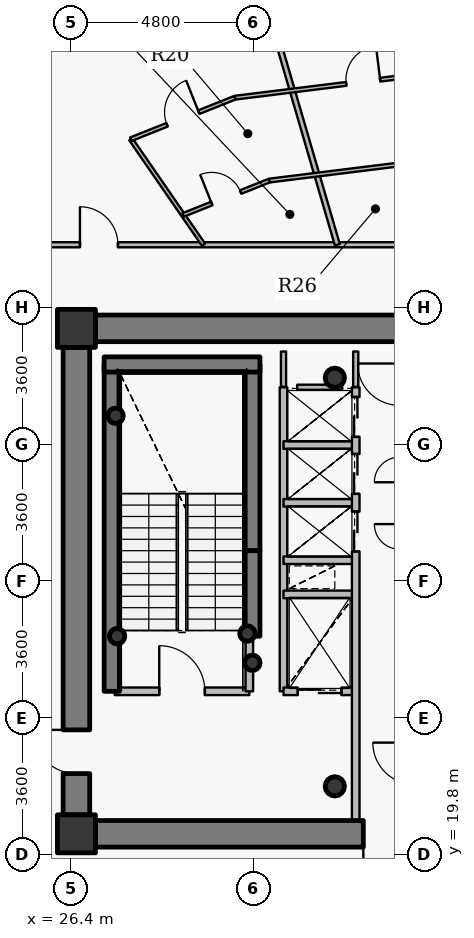
"""IFC4 building model, lengths in metres.
Left out: names, types, materials, properties, quantities, classifications, styles, units other than length and angle.
Written with IfcOpenShell. Run it as: python <this file> out.ifc"""

import sys

from ifc_helpers import new_model, si_unit, direction, frame, frame_2d, origin, origin_2d, place, context, subcontext, project, spatial, rectangle, hollow_circle, extrude, source, transform, mapped, element, fill, save


model = new_model("IFC4")
c1 = context("Model", 3, precision=1e-05, world=origin(), true_north=direction((0.0, 1.0)))
c2 = subcontext(c1, "Body", "Model", "MODEL_VIEW")
j1 = project(units=[si_unit("LENGTHUNIT", "METRE"), si_unit("PLANEANGLEUNIT", "RADIAN")], contexts=[c1])
p1 = place(None, origin())
s1 = spatial("IfcSite", under=j1, at=p1, CompositionType="ELEMENT")
p2 = place(p1, origin())
s2 = spatial("IfcBuilding", under=s1, at=p2, CompositionType="ELEMENT")
p3 = place(p2, frame((0.0, 0.0, 221.55)))
s3 = spatial("IfcBuildingStorey", under=s2, at=p3, CompositionType="ELEMENT", Elevation=221.55)
for number, where, z_axis, x_axis in (
    (1, (26.55, 20.35, 0.0), (0.0, 0.0, 1.0), (1.0, 0.0, 0.0)),
    (2, (26.55, 33.65, 0.0), (0.0, 0.0, 1.0), (1.0, 0.0, 0.0)),
):
    element("IfcColumn", number, at=place(p3, frame(where, z_axis=z_axis, x_axis=x_axis)), inside=s3, PredefinedType="COLUMN", context=c2, shape_type="SweptSolid", body=[
        extrude(rectangle(XDim=1.0, YDim=1.0, at=origin_2d()), origin(), (0.0, 0.0, 1.0), 3.75),
    ])
for number, where, z_axis, x_axis in (
    (3, (33.35, 21.6, 0.0), (0.0, 0.0, 1.0), (1.0, 0.0, 0.0)),
    (4, (33.35, 32.35, 0.0), (0.0, 0.0, 1.0), (1.0, 0.0, 0.0)),
):
    element("IfcColumn", number, at=place(p3, frame(where, z_axis=z_axis, x_axis=x_axis)), inside=s3, PredefinedType="COLUMN", context=c2, shape_type="SweptSolid", body=[
        extrude(hollow_circle(Radius=0.254, WallThickness=0.02, at=origin_2d()), origin(), (0.0, 0.0, 1.0), 3.75),
    ])
p4 = place(p3, frame((27.48, 24.1, 0.0), z_axis=(0.0, 0.0, 1.0), x_axis=(0.0, 1.0, 0.0)))
e5 = element("IfcWall", 5, at=p4, inside=s3, PredefinedType="SHEAR", context=c2, shape_type="SweptSolid", body=[
    extrude(rectangle(XDim=8.6, YDim=0.4, at=frame_2d((4.3, 0.0))), origin(), (0.0, 0.0, 1.0), 3.75),
])
p5 = place(p3, frame((31.18, 27.8, 0.0), z_axis=(0.0, 0.0, 1.0), x_axis=(0.0, 1.0, 0.0)))
e6 = element("IfcWall", 6, at=p5, inside=s3, PredefinedType="SHEAR", context=c2, shape_type="SweptSolid", body=[
    extrude(rectangle(XDim=4.9, YDim=0.4, at=frame_2d((2.45, 0.0))), origin(), (0.0, 0.0, 1.0), 3.75),
])
p6 = place(p3, frame((27.28, 32.7, 0.0), z_axis=(0.0, 0.0, 1.0), x_axis=(1.0, 0.0, 0.0)))
e7 = element("IfcWall", 7, at=p6, inside=s3, PredefinedType="SHEAR", context=c2, shape_type="SweptSolid", body=[
    extrude(rectangle(XDim=4.1, YDim=0.4, at=frame_2d((2.05, 0.0))), origin(), (0.0, 0.0, 1.0), 3.75),
])
for number, where, z_axis, x_axis in (
    (8, (27.58, 31.35, 0.0), (0.0, 0.0, 1.0), (1.0, 0.0, 0.0)),
    (9, (31.05, 25.62, 0.0), (0.0, 0.0, 1.0), (1.0, 0.0, 0.0)),
    (10, (31.18, 24.85, 0.0), (0.0, 0.0, 1.0), (1.0, 0.0, 0.0)),
    (11, (27.62, 25.55, 0.0), (0.0, 0.0, 1.0), (1.0, 0.0, 0.0)),
):
    element("IfcColumn", number, at=place(p3, frame(where, z_axis=z_axis, x_axis=x_axis)), inside=s3, PredefinedType="COLUMN", context=c2, shape_type="SweptSolid", body=[
        extrude(hollow_circle(Radius=0.203, WallThickness=0.016, at=origin_2d()), origin(), (0.0, 0.0, 1.0), 3.75),
    ])
p7 = place(p3, frame((27.05, 33.65, 0.0), z_axis=(0.0, 0.0, 1.0), x_axis=(1.0, 0.0, 0.0)))
e12 = element("IfcWall", 12, at=p7, inside=s3, PredefinedType="SHEAR", context=c2, shape_type="SweptSolid", body=[
    extrude(rectangle(XDim=17.9, YDim=0.7, at=frame_2d((8.95, 0.0))), origin(), (0.0, 0.0, 1.0), 3.05),
])
p8 = place(p7, frame((13.675, 0.0, 0.0)))
e13 = element("IfcOpeningElement", 13, at=p8, cuts=e12, PredefinedType="OPENING", context=c2, shape_type="SweptSolid", body=[
    extrude(rectangle(XDim=1.15, YDim=2.15, at=origin_2d()), frame((0.575, 0.36, 1.075), z_axis=(0.0, -1.0, 0.0), x_axis=(1.0, 0.0, 0.0)), (0.0, 0.0, 1.0), 0.72),
])
p9 = place(p3, frame((44.95, 20.35, 0.0), z_axis=(0.0, 0.0, 1.0), x_axis=(-1.0, 0.0, 0.0)))
e14 = element("IfcWall", 14, at=p9, inside=s3, PredefinedType="SHEAR", context=c2, shape_type="SweptSolid", body=[
    extrude(rectangle(XDim=17.9, YDim=0.7, at=frame_2d((8.95, 0.0))), origin(), (0.0, 0.0, 1.0), 3.05),
])
p10 = place(p9, frame((9.7, 0.0, 0.0)))
e15 = element("IfcOpeningElement", 15, at=p10, cuts=e14, PredefinedType="OPENING", context=c2, shape_type="SweptSolid", body=[
    extrude(rectangle(XDim=1.15, YDim=2.15, at=origin_2d()), frame((0.575, 0.36, 1.075), z_axis=(0.0, -1.0, 0.0), x_axis=(1.0, 0.0, 0.0)), (0.0, 0.0, 1.0), 0.72),
])
p11 = place(p3, frame((26.55, 20.85, 0.0), z_axis=(0.0, 0.0, 1.0), x_axis=(0.0, 1.0, 0.0)))
e16 = element("IfcWall", 16, at=p11, inside=s3, PredefinedType="SHEAR", context=c2, shape_type="SweptSolid", body=[
    extrude(rectangle(XDim=12.3, YDim=0.7, at=frame_2d((6.15, 0.0))), origin(), (0.0, 0.0, 1.0), 3.05),
])
p12 = place(p11, frame((1.085, 0.0, 0.0)))
e17 = element("IfcOpeningElement", 17, at=p12, cuts=e16, PredefinedType="OPENING", context=c2, shape_type="SweptSolid", body=[
    extrude(rectangle(XDim=1.15, YDim=2.15, at=origin_2d()), frame((0.575, 0.36, 1.075), z_axis=(0.0, -1.0, 0.0), x_axis=(1.0, 0.0, 0.0)), (0.0, 0.0, 1.0), 0.72),
])
p13 = place(p3, frame((31.18, 25.55, 0.0), z_axis=(0.0, 0.0, 1.0), x_axis=(0.0, 1.0, 0.0)))
e18 = element("IfcWall", 18, at=p13, inside=s3, PredefinedType="SHEAR", context=c2, shape_type="SweptSolid", body=[
    extrude(rectangle(XDim=2.25, YDim=0.4, at=frame_2d((1.125, 0.0))), origin(), (0.0, 0.0, 1.0), 3.1),
])
p14 = place(p3, frame((24.35, 35.85, 0.0), z_axis=(0.0, 0.0, 1.0), x_axis=(1.0, 0.0, 0.0)))
e19 = element("IfcWall", 19, at=p14, inside=s3, PredefinedType="PARTITIONING", context=c2, shape_type="SweptSolid", body=[
    extrude(rectangle(XDim=26.218, YDim=0.135, at=frame_2d((13.109, 0.0))), origin(), (0.0, 0.0, 1.0), 2.935),
])
p15 = place(p14, frame((21.507, 0.0, 0.0)))
e20 = element("IfcOpeningElement", 20, at=p15, cuts=e19, PredefinedType="OPENING", context=c2, shape_type="SweptSolid", body=[
    extrude(rectangle(XDim=1.0, YDim=2.15, at=origin_2d()), frame((0.5, 0.078, 1.075), z_axis=(0.0, -1.0, 0.0), x_axis=(1.0, 0.0, 0.0)), (0.0, 0.0, 1.0), 0.155),
])
p16 = place(p14, frame((12.95, 0.0, 0.0)))
e21 = element("IfcOpeningElement", 21, at=p16, cuts=e19, PredefinedType="OPENING", context=c2, shape_type="SweptSolid", body=[
    extrude(rectangle(XDim=1.0, YDim=2.15, at=origin_2d()), frame((0.5, 0.078, 1.075), z_axis=(0.0, -1.0, 0.0), x_axis=(1.0, 0.0, 0.0)), (0.0, 0.0, 1.0), 0.155),
])
p17 = place(p14, frame((2.293, 0.0, 0.0)))
e22 = element("IfcOpeningElement", 22, at=p17, cuts=e19, PredefinedType="OPENING", context=c2, shape_type="SweptSolid", body=[
    extrude(rectangle(XDim=1.0, YDim=2.15, at=origin_2d()), frame((0.5, 0.078, 1.075), z_axis=(0.0, -1.0, 0.0), x_axis=(1.0, 0.0, 0.0)), (0.0, 0.0, 1.0), 0.155),
])
p18 = place(p3, frame((27.56, 24.1, 0.0), z_axis=(0.0, 0.0, 1.0), x_axis=(1.0, 0.0, 0.0)))
e23 = element("IfcWall", 23, at=p18, inside=s3, PredefinedType="PARTITIONING", context=c2, shape_type="SweptSolid", body=[
    extrude(rectangle(XDim=3.54, YDim=0.2, at=frame_2d((1.77, 0.0))), origin(), (0.0, 0.0, 1.0), 3.5),
])
p19 = place(p18, frame((1.17, 0.0, 0.0)))
e24 = element("IfcOpeningElement", 24, at=p19, cuts=e23, PredefinedType="OPENING", context=c2, shape_type="SweptSolid", body=[
    extrude(rectangle(XDim=1.2, YDim=2.15, at=origin_2d()), frame((0.6, 0.11, 1.075), z_axis=(0.0, -1.0, 0.0), x_axis=(1.0, 0.0, 0.0)), (0.0, 0.0, 1.0), 0.22),
])
p20 = place(p3, frame((27.982, 38.626, 0.0), z_axis=(0.0, 0.0, 1.0), x_axis=(0.56776340906, -0.823191782838, 0.0)))
e25 = element("IfcWall", 25, at=p20, inside=s3, PredefinedType="PARTITIONING", context=c2, shape_type="SweptSolid", body=[
    extrude(rectangle(XDim=3.372, YDim=0.1, at=frame_2d((1.686, 0.0))), origin(), (0.0, 0.0, 1.0), 3.5),
])
p21 = place(p3, frame((27.982, 38.626, 0.0), z_axis=(0.0, 0.0, 1.0), x_axis=(0.928795965169, 0.370591493542, 0.0)))
e26 = element("IfcWall", 26, at=p21, inside=s3, PredefinedType="PARTITIONING", context=c2, shape_type="SweptSolid", body=[
    extrude(rectangle(XDim=2.95, YDim=0.1, at=frame_2d((1.475, 0.0))), origin(), (0.0, 0.0, 1.0), 2.935),
])
p22 = place(p21, frame((1.025, 0.0, 0.0)))
e27 = element("IfcOpeningElement", 27, at=p22, cuts=e26, PredefinedType="OPENING", context=c2, shape_type="SweptSolid", body=[
    extrude(rectangle(XDim=0.9, YDim=2.1, at=origin_2d()), frame((0.45, 0.06, 1.05), z_axis=(0.0, -1.0, 0.0), x_axis=(1.0, 0.0, 0.0)), (0.0, 0.0, 1.0), 0.12),
])
p23 = place(p3, frame((29.356, 36.633, 0.0), z_axis=(0.0, 0.0, 1.0), x_axis=(0.928806968298, 0.370563915731, 0.0)))
e28 = element("IfcWall", 28, at=p23, inside=s3, PredefinedType="PARTITIONING", context=c2, shape_type="SweptSolid", body=[
    extrude(rectangle(XDim=2.444, YDim=0.1, at=frame_2d((1.222, 0.0))), origin(), (0.0, 0.0, 1.0), 2.935),
])
p24 = place(p23, frame((0.812, 0.0, 0.0)))
e29 = element("IfcOpeningElement", 29, at=p24, cuts=e28, PredefinedType="OPENING", context=c2, shape_type="SweptSolid", body=[
    extrude(rectangle(XDim=0.82, YDim=2.1, at=origin_2d()), frame((0.41, 0.06, 1.05), z_axis=(0.0, -1.0, 0.0), x_axis=(1.0, 0.0, 0.0)), (0.0, 0.0, 1.0), 0.12),
])
p25 = place(p3, frame((30.613, 45.453, 0.0), z_axis=(0.0, 0.0, 1.0), x_axis=(0.280222100614, -0.959935192775, 0.0)))
e30 = element("IfcWall", 30, at=p25, inside=s3, PredefinedType="PARTITIONING", context=c2, shape_type="SweptSolid", body=[
    extrude(rectangle(XDim=10.004, YDim=0.135, at=frame_2d((5.002, 0.0))), origin(), (0.0, 0.0, 1.0), 2.985),
])
p26 = place(p3, frame((30.722, 39.719, 0.0), z_axis=(0.0, 0.0, 1.0), x_axis=(0.992398169186, 0.123068573551, 0.0)))
e31 = element("IfcWall", 31, at=p26, inside=s3, PredefinedType="PARTITIONING", context=c2, shape_type="SweptSolid", body=[
    extrude(rectangle(XDim=5.319, YDim=0.1, at=frame_2d((2.659, 0.0))), origin(), (0.0, 0.0, 1.0), 2.935),
])
p27 = place(p26, frame((2.95, 0.0, 0.0)))
e32 = element("IfcOpeningElement", 32, at=p27, cuts=e31, PredefinedType="OPENING", context=c2, shape_type="SweptSolid", body=[
    extrude(rectangle(XDim=0.9, YDim=2.1, at=origin_2d()), frame((0.45, 0.06, 1.05), z_axis=(0.0, -1.0, 0.0), x_axis=(1.0, 0.0, 0.0)), (0.0, 0.0, 1.0), 0.12),
])
p28 = place(p3, frame((31.1, 24.1, 0.0), z_axis=(0.0, 0.0, 1.0), x_axis=(0.0, 1.0, 0.0)))
e33 = element("IfcWall", 33, at=p28, inside=s3, PredefinedType="PARTITIONING", context=c2, shape_type="SweptSolid", body=[
    extrude(rectangle(XDim=1.44, YDim=0.2, at=frame_2d((0.72, 0.0))), origin(), (0.0, 0.0, 1.0), 3.5),
])
p29 = place(p3, frame((31.627, 37.539, 0.0), z_axis=(0.0, 0.0, 1.0), x_axis=(0.992401810072, 0.123039210683, 0.0)))
e34 = element("IfcWall", 34, at=p29, inside=s3, PredefinedType="PARTITIONING", context=c2, shape_type="SweptSolid", body=[
    extrude(rectangle(XDim=4.407, YDim=0.1, at=frame_2d((2.204, 0.0))), origin(), (0.0, 0.0, 1.0), 2.935),
])
p30 = place(p3, frame((32.0, 24.1, 0.0), z_axis=(0.0, 0.0, 1.0), x_axis=(0.0, 1.0, 0.0)))
e35 = element("IfcWall", 35, at=p30, inside=s3, PredefinedType="PARTITIONING", context=c2, shape_type="SweptSolid", body=[
    extrude(rectangle(XDim=8.0, YDim=0.2, at=frame_2d((4.0, 0.0))), origin(), (0.0, 0.0, 1.0), 3.5),
])
p31 = place(p3, frame((32.0, 24.1, 0.0), z_axis=(0.0, 0.0, 1.0), x_axis=(1.0, 0.0, 0.0)))
e36 = element("IfcWall", 36, at=p31, inside=s3, PredefinedType="PARTITIONING", context=c2, shape_type="SweptSolid", body=[
    extrude(rectangle(XDim=1.9, YDim=0.2, at=frame_2d((0.95, 0.0))), origin(), (0.0, 0.0, 1.0), 3.085),
])
p32 = place(p31, frame((0.375, 0.0, 0.0)))
e37 = element("IfcOpeningElement", 37, at=p32, cuts=e36, PredefinedType="OPENING", context=c2, shape_type="SweptSolid", body=[
    extrude(rectangle(XDim=1.15, YDim=2.15, at=origin_2d()), frame((0.575, 0.11, 1.075), z_axis=(0.0, -1.0, 0.0), x_axis=(1.0, 0.0, 0.0)), (0.0, 0.0, 1.0), 0.22),
])
for number, where, z_axis, x_axis in (
    (38, (32.0, 26.65, 0.0), (0.0, 0.0, 1.0), (1.0, 0.0, 0.0)),
    (39, (32.0, 27.55, 0.0), (0.0, 0.0, 1.0), (1.0, 0.0, 0.0)),
    (40, (32.0, 29.06, 0.0), (0.0, 0.0, 1.0), (1.0, 0.0, 0.0)),
    (41, (32.0, 30.58, 0.0), (0.0, 0.0, 1.0), (1.0, 0.0, 0.0)),
):
    element("IfcWall", number, at=place(p3, frame(where, z_axis=z_axis, x_axis=x_axis)), inside=s3, PredefinedType="PARTITIONING", context=c2, shape_type="SweptSolid", body=[
        extrude(rectangle(XDim=1.9, YDim=0.2, at=frame_2d((0.95, 0.0))), origin(), (0.0, 0.0, 1.0), 3.085),
    ])
p33 = place(p3, frame((33.9, 20.7, 0.0), z_axis=(0.0, 0.0, 1.0), x_axis=(0.0, 1.0, 0.0)))
e42 = element("IfcWall", 42, at=p33, inside=s3, PredefinedType="PARTITIONING", context=c2, shape_type="SweptSolid", body=[
    extrude(rectangle(XDim=11.4, YDim=0.2, at=frame_2d((5.7, 0.0))), origin(), (0.0, 0.0, 1.0), 3.085),
])
p34 = place(p33, frame((7.08, 0.0, 0.0)))
e43 = element("IfcOpeningElement", 43, at=p34, cuts=e42, PredefinedType="OPENING", context=c2, shape_type="SweptSolid", body=[
    extrude(rectangle(XDim=1.05, YDim=2.15, at=origin_2d()), frame((0.525, 0.11, 1.075), z_axis=(0.0, -1.0, 0.0), x_axis=(1.0, 0.0, 0.0)), (0.0, 0.0, 1.0), 0.22),
])
p35 = place(p33, frame((8.595, 0.0, 0.0)))
e44 = element("IfcOpeningElement", 44, at=p35, cuts=e42, PredefinedType="OPENING", context=c2, shape_type="SweptSolid", body=[
    extrude(rectangle(XDim=1.05, YDim=2.15, at=origin_2d()), frame((0.525, 0.11, 1.075), z_axis=(0.0, -1.0, 0.0), x_axis=(1.0, 0.0, 0.0)), (0.0, 0.0, 1.0), 0.22),
])
p36 = place(p33, frame((10.095, 0.0, 0.0)))
e45 = element("IfcOpeningElement", 45, at=p36, cuts=e42, PredefinedType="OPENING", context=c2, shape_type="SweptSolid", body=[
    extrude(rectangle(XDim=1.05, YDim=2.15, at=origin_2d()), frame((0.525, 0.11, 1.075), z_axis=(0.0, -1.0, 0.0), x_axis=(1.0, 0.0, 0.0)), (0.0, 0.0, 1.0), 0.22),
])
p37 = place(p3, frame((32.36, 32.1, 0.0), z_axis=(0.0, 0.0, 1.0), x_axis=(1.0, 0.0, 0.0)))
e46 = element("IfcWall", 46, at=p37, inside=s3, PredefinedType="PARTITIONING", context=c2, shape_type="SweptSolid", body=[
    extrude(rectangle(XDim=1.18, YDim=0.135, at=frame_2d((0.59, 0.0))), origin(), (0.0, 0.0, 1.0), 3.085),
])
p38 = place(p3, frame((32.0, 33.04, 0.0), z_axis=(0.0, 0.0, 1.0), x_axis=(0.0, -1.0, 0.0)))
e47 = element("IfcWall", 47, at=p38, inside=s3, PredefinedType="PARTITIONING", context=c2, shape_type="SweptSolid", body=[
    extrude(rectangle(XDim=0.93, YDim=0.135, at=frame_2d((0.465, 0.0))), origin(), (0.0, 0.0, 1.0), 3.035),
])
p39 = place(p3, frame((33.9, 32.11, 0.0), z_axis=(0.0, 0.0, 1.0), x_axis=(0.0, 1.0, 0.0)))
e48 = element("IfcWall", 48, at=p39, inside=s3, PredefinedType="PARTITIONING", context=c2, shape_type="SweptSolid", body=[
    extrude(rectangle(XDim=0.93, YDim=0.135, at=frame_2d((0.465, 0.0))), origin(), (0.0, 0.0, 1.0), 3.085),
])
p40 = place(p3, frame((27.04, 34.0, 0.0), z_axis=(0.0, 0.0, 1.0), x_axis=(-1.0, 0.0, 0.0)))
e49 = element("IfcWall", 49, at=p40, inside=s3, PredefinedType="PARTITIONING", context=c2, shape_type="SweptSolid", body=[
    extrude(rectangle(XDim=0.84, YDim=0.135, at=frame_2d((0.42, 0.0))), origin(), (0.0, 0.0, 1.0), 2.935),
])
p41 = place(p3, frame((26.2, 33.692, 0.0), z_axis=(0.0, 0.0, 1.0), x_axis=(0.0, -1.0, 0.0)))
e50 = element("IfcWall", 50, at=p41, inside=s3, PredefinedType="PARTITIONING", context=c2, shape_type="SweptSolid", body=[
    extrude(rectangle(XDim=0.532, YDim=0.135, at=frame_2d((0.266, 0.0))), origin(), (0.0, 0.0, 1.0), 3.5),
])
p42 = place(p3, frame((26.2, 20.84, 0.0), z_axis=(0.0, 0.0, 1.0), x_axis=(0.0, -1.0, 0.0)))
e51 = element("IfcWall", 51, at=p42, inside=s3, PredefinedType="PARTITIONING", context=c2, shape_type="SweptSolid", body=[
    extrude(rectangle(XDim=0.84, YDim=0.135, at=frame_2d((0.42, 0.0))), origin(), (0.0, 0.0, 1.0), 3.5),
])
p43 = place(p3, frame((26.508, 20.0, 0.0), z_axis=(0.0, 0.0, 1.0), x_axis=(1.0, 0.0, 0.0)))
e52 = element("IfcWall", 52, at=p43, inside=s3, PredefinedType="PARTITIONING", context=c2, shape_type="SweptSolid", body=[
    extrude(rectangle(XDim=0.532, YDim=0.135, at=frame_2d((0.266, 0.0))), origin(), (0.0, 0.0, 1.0), 2.935),
])
m1 = source(origin(), c2, "Body", "SweptSolid", [
    extrude(rectangle(XDim=1.15, YDim=2.15, at=origin_2d()), frame((0.575, 0.025, 1.075), z_axis=(0.0, -1.0, 0.0), x_axis=(1.0, 0.0, 0.0)), (0.0, 0.0, 1.0), 0.05),
])
p44 = place(p12, origin())
e53 = element("IfcDoor", 53, at=p44, inside=s3, OperationType="SINGLE_SWING_RIGHT", PredefinedType="DOOR", context=c2, shape_type="MappedRepresentation", body=[
    mapped(m1, transform((0.0, 0.0, 0.0), x_axis=(1.0, 0.0, 0.0), y_axis=(0.0, 1.0, 0.0), z_axis=(0.0, 0.0, 1.0), scale=1.0)),
])
fill(e17, e53)
p45 = place(p10, origin())
e54 = element("IfcDoor", 54, at=p45, inside=s3, OperationType="SINGLE_SWING_RIGHT", PredefinedType="DOOR", context=c2, shape_type="MappedRepresentation", body=[
    mapped(m1, transform((0.0, 0.0, 0.0), x_axis=(1.0, 0.0, 0.0), y_axis=(0.0, 1.0, 0.0), z_axis=(0.0, 0.0, 1.0), scale=1.0)),
])
fill(e15, e54)
m2 = source(origin(), c2, "Body", "SweptSolid", [
    extrude(rectangle(XDim=1.2, YDim=2.15, at=origin_2d()), frame((0.6, 0.025, 1.075), z_axis=(0.0, -1.0, 0.0), x_axis=(1.0, 0.0, 0.0)), (0.0, 0.0, 1.0), 0.05),
])
p46 = place(p19, origin())
e55 = element("IfcDoor", 55, at=p46, inside=s3, OperationType="SINGLE_SWING_LEFT", PredefinedType="DOOR", context=c2, shape_type="MappedRepresentation", body=[
    mapped(m2, transform((0.0, 0.0, 0.0), x_axis=(1.0, 0.0, 0.0), y_axis=(0.0, 1.0, 0.0), z_axis=(0.0, 0.0, 1.0), scale=1.0)),
])
fill(e24, e55)
m3 = source(origin(), c2, "Body", "SweptSolid", [
    extrude(rectangle(XDim=1.15, YDim=2.15, at=origin_2d()), frame((0.575, 0.025, 1.075), z_axis=(0.0, -1.0, 0.0), x_axis=(1.0, 0.0, 0.0)), (0.0, 0.0, 1.0), 0.05),
])
p47 = place(p32, origin())
e56 = element("IfcDoor", 56, at=p47, inside=s3, OperationType="DOUBLE_DOOR_SLIDING", PredefinedType="USERDEFINED", context=c2, shape_type="MappedRepresentation", body=[
    mapped(m3, transform((0.0, 0.0, 0.0), x_axis=(1.0, 0.0, 0.0), y_axis=(0.0, 1.0, 0.0), z_axis=(0.0, 0.0, 1.0), scale=1.0)),
])
fill(e37, e56)
m4 = source(origin(), c2, "Body", "SweptSolid", [
    extrude(rectangle(XDim=1.05, YDim=2.15, at=origin_2d()), frame((0.525, 0.025, 1.075), z_axis=(0.0, -1.0, 0.0), x_axis=(1.0, 0.0, 0.0)), (0.0, 0.0, 1.0), 0.05),
])
p48 = place(p34, origin())
e57 = element("IfcDoor", 57, at=p48, inside=s3, OperationType="DOUBLE_DOOR_SLIDING", PredefinedType="USERDEFINED", context=c2, shape_type="MappedRepresentation", body=[
    mapped(m4, transform((0.0, 0.0, 0.0), x_axis=(1.0, 0.0, 0.0), y_axis=(0.0, 1.0, 0.0), z_axis=(0.0, 0.0, 1.0), scale=1.0)),
])
fill(e43, e57)
p49 = place(p35, origin())
e58 = element("IfcDoor", 58, at=p49, inside=s3, OperationType="DOUBLE_DOOR_SLIDING", PredefinedType="USERDEFINED", context=c2, shape_type="MappedRepresentation", body=[
    mapped(m4, transform((0.0, 0.0, 0.0), x_axis=(1.0, 0.0, 0.0), y_axis=(0.0, 1.0, 0.0), z_axis=(0.0, 0.0, 1.0), scale=1.0)),
])
fill(e44, e58)
p50 = place(p36, origin())
e59 = element("IfcDoor", 59, at=p50, inside=s3, OperationType="DOUBLE_DOOR_SLIDING", PredefinedType="USERDEFINED", context=c2, shape_type="MappedRepresentation", body=[
    mapped(m4, transform((0.0, 0.0, 0.0), x_axis=(1.0, 0.0, 0.0), y_axis=(0.0, 1.0, 0.0), z_axis=(0.0, 0.0, 1.0), scale=1.0)),
])
fill(e45, e59)
m5 = source(origin(), c2, "Body", "SweptSolid", [
    extrude(rectangle(XDim=0.9, YDim=2.1, at=origin_2d()), frame((0.45, 0.025, 1.05), z_axis=(0.0, -1.0, 0.0), x_axis=(1.0, 0.0, 0.0)), (0.0, 0.0, 1.0), 0.05),
])
p51 = place(p27, origin())
e60 = element("IfcDoor", 60, at=p51, inside=s3, OperationType="SINGLE_SWING_RIGHT", PredefinedType="DOOR", context=c2, shape_type="MappedRepresentation", body=[
    mapped(m5, transform((0.0, 0.0, 0.0), x_axis=(1.0, 0.0, 0.0), y_axis=(0.0, 1.0, 0.0), z_axis=(0.0, 0.0, 1.0), scale=1.0)),
])
fill(e32, e60)
m6 = source(origin(), c2, "Body", "SweptSolid", [
    extrude(rectangle(XDim=1.0, YDim=2.15, at=origin_2d()), frame((0.5, 0.025, 1.075), z_axis=(0.0, -1.0, 0.0), x_axis=(1.0, 0.0, 0.0)), (0.0, 0.0, 1.0), 0.05),
])
p52 = place(p17, origin())
e61 = element("IfcDoor", 61, at=p52, inside=s3, OperationType="SINGLE_SWING_LEFT", PredefinedType="DOOR", context=c2, shape_type="MappedRepresentation", body=[
    mapped(m6, transform((0.0, 0.0, 0.0), x_axis=(1.0, 0.0, 0.0), y_axis=(0.0, 1.0, 0.0), z_axis=(0.0, 0.0, 1.0), scale=1.0)),
])
fill(e22, e61)
p53 = place(p22, origin())
e62 = element("IfcDoor", 62, at=p53, inside=s3, OperationType="SINGLE_SWING_RIGHT", PredefinedType="DOOR", context=c2, shape_type="MappedRepresentation", body=[
    mapped(m5, transform((0.0, 0.0, 0.0), x_axis=(1.0, 0.0, 0.0), y_axis=(0.0, 1.0, 0.0), z_axis=(0.0, 0.0, 1.0), scale=1.0)),
])
fill(e27, e62)
m7 = source(origin(), c2, "Body", "SweptSolid", [
    extrude(rectangle(XDim=0.82, YDim=2.1, at=origin_2d()), frame((0.41, 0.025, 1.05), z_axis=(0.0, -1.0, 0.0), x_axis=(1.0, 0.0, 0.0)), (0.0, 0.0, 1.0), 0.05),
])
p54 = place(p24, origin())
e63 = element("IfcDoor", 63, at=p54, inside=s3, OperationType="SINGLE_SWING_LEFT", PredefinedType="DOOR", context=c2, shape_type="MappedRepresentation", body=[
    mapped(m7, transform((0.0, 0.0, 0.0), x_axis=(1.0, 0.0, 0.0), y_axis=(0.0, 1.0, 0.0), z_axis=(0.0, 0.0, 1.0), scale=1.0)),
])
fill(e29, e63)
save(model, sys.argv[1])
